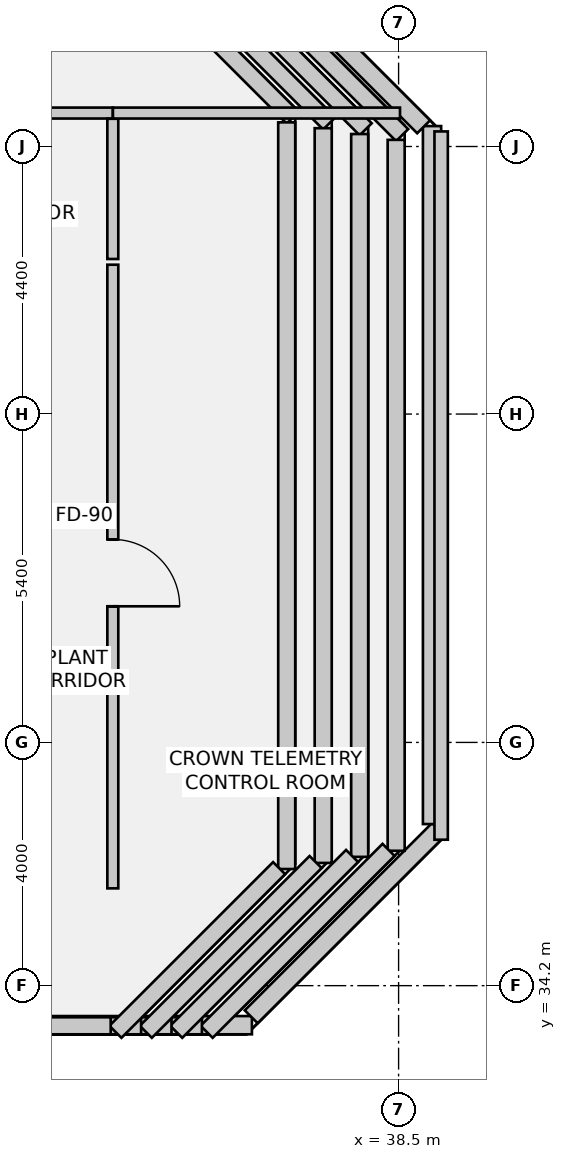
"""IFC4 building model, lengths in metres.
Left out: names, types, materials, properties, quantities, classifications, styles, units other than length and angle.
Written with IfcOpenShell. Run it as: python <this file> out.ifc"""

import sys

from ifc_helpers import new_model, si_unit, direction, frame, frame_2d, origin, place, context, subcontext, project, spatial, rectangle, extrude, source, transform, mapped, element, fill, save


model = new_model("IFC4")
c1 = context("Model", 3, precision=1e-05, world=origin(), true_north=direction((0.0, 1.0)))
c2 = subcontext(c1, "Body", "Model", "MODEL_VIEW")
j1 = project(units=[si_unit("LENGTHUNIT", "METRE"), si_unit("PLANEANGLEUNIT", "RADIAN")], contexts=[c1])
p1 = place(None, origin())
s1 = spatial("IfcSite", under=j1, at=p1, CompositionType="ELEMENT")
p2 = place(p1, origin())
s2 = spatial("IfcBuilding", under=s1, at=p2, CompositionType="ELEMENT")
p3 = place(p2, frame((0.0, 0.0, 309.5)))
s3 = spatial("IfcBuildingStorey", under=s2, at=p3, CompositionType="ELEMENT", Elevation=309.5)
p4 = place(p3, frame((27.733, 33.55, 0.0), z_axis=(0.0, 0.0, 1.0), x_axis=(1.0, 0.0, 0.0)))
e1 = element("IfcWall", 1, at=p4, inside=s3, PredefinedType="SOLIDWALL", context=c2, shape_type="SweptSolid", body=[
    extrude(rectangle(XDim=8.355, YDim=0.3, at=frame_2d((4.177, 0.0))), origin(), (0.0, 0.0, 1.0), 5.1),
])
p5 = place(p3, frame((36.076, 33.688, 0.0), z_axis=(0.0, 0.0, 1.0), x_axis=(0.707078757535, 0.707134803727, 0.0)))
e2 = element("IfcWall", 2, at=p5, inside=s3, PredefinedType="SOLIDWALL", context=c2, shape_type="SweptSolid", body=[
    extrude(rectangle(XDim=4.356, YDim=0.3, at=frame_2d((2.178, 0.0))), origin(), (0.0, 0.0, 1.0), 5.1),
])
p6 = place(p3, frame((39.05, 36.857, 0.0), z_axis=(0.0, 0.0, 1.0), x_axis=(0.0, 1.0, 0.0)))
e3 = element("IfcWall", 3, at=p6, inside=s3, PredefinedType="SOLIDWALL", context=c2, shape_type="SweptSolid", body=[
    extrude(rectangle(XDim=11.479, YDim=0.3, at=frame_2d((5.739, 0.0))), origin(), (0.0, 0.0, 1.0), 5.1),
])
p7 = place(p3, frame((38.912, 48.324, 0.0), z_axis=(0.0, 0.0, 1.0), x_axis=(-0.70715242601, 0.707061133417, 0.0)))
e4 = element("IfcWall", 4, at=p7, inside=s3, PredefinedType="SOLIDWALL", context=c2, shape_type="SweptSolid", body=[
    extrude(rectangle(XDim=2.674, YDim=0.3, at=frame_2d((1.337, 0.0))), origin(), (0.0, 0.0, 1.0), 5.1),
])
p8 = place(p3, frame((39.2, 36.6, 5.4), z_axis=(0.0, 0.0, 1.0), x_axis=(0.0, 1.0, 0.0)))
e5 = element("IfcWall", 5, at=p8, inside=s3, PredefinedType="PARAPET", context=c2, shape_type="SweptSolid", body=[
    extrude(rectangle(XDim=11.648, YDim=0.22, at=frame_2d((5.824, 0.0))), origin(), (0.0, 0.0, 1.0), 0.95),
])
p9 = place(p3, frame((36.639, 50.107, 5.4), z_axis=(0.0, 0.0, 1.0), x_axis=(0.707106781187, -0.707106781187, 0.0)))
e6 = element("IfcWall", 6, at=p9, inside=s3, PredefinedType="SOLIDWALL", context=c2, shape_type="SweptSolid", body=[
    extrude(rectangle(XDim=2.715, YDim=0.28, at=frame_2d((1.357, 0.0))), origin(), (0.0, 0.0, 1.0), 3.08),
])
p10 = place(p3, frame((38.46, 48.109, 5.4), z_axis=(0.0, 0.0, 1.0), x_axis=(0.0, -1.0, 0.0)))
e7 = element("IfcWall", 7, at=p10, inside=s3, PredefinedType="SOLIDWALL", context=c2, shape_type="SweptSolid", body=[
    extrude(rectangle(XDim=11.691, YDim=0.28, at=frame_2d((5.846, 0.0))), origin(), (0.0, 0.0, 1.0), 3.08),
])
p11 = place(p3, frame((38.335, 36.433, 5.4), z_axis=(0.0, 0.0, 1.0), x_axis=(-0.707077932049, -0.707135629147, 0.0)))
e8 = element("IfcWall", 8, at=p11, inside=s3, PredefinedType="SOLIDWALL", context=c2, shape_type="SweptSolid", body=[
    extrude(rectangle(XDim=4.231, YDim=0.28, at=frame_2d((2.116, 0.0))), origin(), (0.0, 0.0, 1.0), 3.08),
])
p12 = place(p3, frame((35.265, 33.54, 5.4), z_axis=(0.0, 0.0, 1.0), x_axis=(-1.0, 0.0, 0.0)))
e9 = element("IfcWall", 9, at=p12, inside=s3, PredefinedType="SOLIDWALL", context=c2, shape_type="SweptSolid", body=[
    extrude(rectangle(XDim=8.159, YDim=0.28, at=frame_2d((4.08, 0.0))), origin(), (0.0, 0.0, 1.0), 3.08),
])
p13 = place(p3, frame((36.039, 50.203, 9.982), z_axis=(0.0, 0.0, 1.0), x_axis=(0.707106781187, -0.707106781187, 0.0)))
e10 = element("IfcWall", 10, at=p13, inside=s3, PredefinedType="SOLIDWALL", context=c2, shape_type="SweptSolid", body=[
    extrude(rectangle(XDim=2.715, YDim=0.28, at=frame_2d((1.357, 0.0))), origin(), (0.0, 0.0, 1.0), 2.998),
])
p14 = place(p3, frame((37.86, 48.205, 9.68), z_axis=(0.0, 0.0, 1.0), x_axis=(0.0, -1.0, 0.0)))
e11 = element("IfcWall", 11, at=p14, inside=s3, PredefinedType="SOLIDWALL", context=c2, shape_type="SweptSolid", body=[
    extrude(rectangle(XDim=11.887, YDim=0.28, at=frame_2d((5.943, 0.0))), origin(), (0.0, 0.0, 1.0), 3.3),
])
p15 = place(p3, frame((37.735, 36.333, 9.532), z_axis=(0.0, 0.0, 1.0), x_axis=(-0.707106781187, -0.707106781187, 0.0)))
e12 = element("IfcWall", 12, at=p15, inside=s3, PredefinedType="SOLIDWALL", context=c2, shape_type="SweptSolid", body=[
    extrude(rectangle(XDim=4.09, YDim=0.28, at=frame_2d((2.045, 0.0))), origin(), (0.0, 0.0, 1.0), 3.448),
])
p16 = place(p3, frame((34.765, 33.54, 9.338), z_axis=(0.0, 0.0, 1.0), x_axis=(-1.0, 0.0, 0.0)))
e13 = element("IfcWall", 13, at=p16, inside=s3, PredefinedType="SOLIDWALL", context=c2, shape_type="SweptSolid", body=[
    extrude(rectangle(XDim=7.763, YDim=0.28, at=frame_2d((3.882, 0.0))), origin(), (0.0, 0.0, 1.0), 3.642),
])
p17 = place(p3, frame((35.439, 50.299, 14.482), z_axis=(0.0, 0.0, 1.0), x_axis=(0.707061818431, -0.707151741083, 0.0)))
e14 = element("IfcWall", 14, at=p17, inside=s3, PredefinedType="SOLIDWALL", context=c2, shape_type="SweptSolid", body=[
    extrude(rectangle(XDim=2.715, YDim=0.28, at=frame_2d((1.357, 0.0))), origin(), (0.0, 0.0, 1.0), 2.998),
])
p18 = place(p3, frame((37.26, 48.301, 14.168), z_axis=(0.0, 0.0, 1.0), x_axis=(0.0, -1.0, 0.0)))
e15 = element("IfcWall", 15, at=p18, inside=s3, PredefinedType="SOLIDWALL", context=c2, shape_type="SweptSolid", body=[
    extrude(rectangle(XDim=12.083, YDim=0.28, at=frame_2d((6.042, 0.0))), origin(), (0.0, 0.0, 1.0), 3.312),
])
p19 = place(p3, frame((37.135, 36.233, 14.023), z_axis=(0.0, 0.0, 1.0), x_axis=(-0.707106781187, -0.707106781187, 0.0)))
e16 = element("IfcWall", 16, at=p19, inside=s3, PredefinedType="SOLIDWALL", context=c2, shape_type="SweptSolid", body=[
    extrude(rectangle(XDim=3.948, YDim=0.28, at=frame_2d((1.974, 0.0))), origin(), (0.0, 0.0, 1.0), 3.457),
])
p20 = place(p3, frame((34.265, 33.54, 13.838), z_axis=(0.0, 0.0, 1.0), x_axis=(-1.0, 0.0, 0.0)))
e17 = element("IfcWall", 17, at=p20, inside=s3, PredefinedType="SOLIDWALL", context=c2, shape_type="SweptSolid", body=[
    extrude(rectangle(XDim=7.263, YDim=0.28, at=frame_2d((3.632, 0.0))), origin(), (0.0, 0.0, 1.0), 3.642),
])
p21 = place(p3, frame((34.839, 50.395, 18.982), z_axis=(0.0, 0.0, 1.0), x_axis=(0.707106781187, -0.707106781187, 0.0)))
e18 = element("IfcWall", 18, at=p21, inside=s3, PredefinedType="SOLIDWALL", context=c2, shape_type="SweptSolid", body=[
    extrude(rectangle(XDim=2.715, YDim=0.28, at=frame_2d((1.357, 0.0))), origin(), (0.0, 0.0, 1.0), 2.378),
])
p22 = place(p3, frame((36.66, 48.397, 18.657), z_axis=(0.0, 0.0, 1.0), x_axis=(0.0, -1.0, 0.0)))
e19 = element("IfcWall", 19, at=p22, inside=s3, PredefinedType="SOLIDWALL", context=c2, shape_type="SweptSolid", body=[
    extrude(rectangle(XDim=12.279, YDim=0.28, at=frame_2d((6.14, 0.0))), origin(), (0.0, 0.0, 1.0), 2.703),
])
p23 = place(p3, frame((36.535, 36.133, 18.513), z_axis=(0.0, 0.0, 1.0), x_axis=(-0.707074716487, -0.707138844432, 0.0)))
e20 = element("IfcWall", 20, at=p23, inside=s3, PredefinedType="SOLIDWALL", context=c2, shape_type="SweptSolid", body=[
    extrude(rectangle(XDim=3.807, YDim=0.28, at=frame_2d((1.904, 0.0))), origin(), (0.0, 0.0, 1.0), 2.847),
])
p24 = place(p3, frame((33.765, 33.54, 18.337), z_axis=(0.0, 0.0, 1.0), x_axis=(-1.0, 0.0, 0.0)))
e21 = element("IfcWall", 21, at=p24, inside=s3, PredefinedType="SOLIDWALL", context=c2, shape_type="SweptSolid", body=[
    extrude(rectangle(XDim=6.763, YDim=0.28, at=frame_2d((3.382, 0.0))), origin(), (0.0, 0.0, 1.0), 3.023),
])
p25 = place(p3, frame((16.144, 48.55, 0.0), z_axis=(0.0, 0.0, 1.0), x_axis=(1.0, 0.0, 0.0)))
e22 = element("IfcWall", 22, at=p25, inside=s3, PredefinedType="PARTITIONING", context=c2, shape_type="SweptSolid", body=[
    extrude(rectangle(XDim=17.656, YDim=0.18, at=frame_2d((8.828, 0.0))), origin(), (0.0, 0.0, 1.0), 4.392),
])
m1 = source(origin(), c2, "Body", "SweptSolid", [
    extrude(rectangle(XDim=1.1, YDim=2.15, at=frame_2d((0.55, 1.075))), frame((0.0, 0.1, 0.0), z_axis=(0.0, -1.0, 0.0), x_axis=(1.0, 0.0, 0.0)), (0.0, 0.0, 1.0), 0.2),
])
p26 = place(p25, frame((9.06, 0.0, 0.0)))
e23 = element("IfcOpeningElement", 23, at=p26, cuts=e22, PredefinedType="OPENING", context=c2, shape_type="MappedRepresentation", body=[
    mapped(m1, transform((0.0, 0.0, 0.0), scale=1.0)),
])
p27 = place(p3, frame((33.8, 48.456, 0.0), z_axis=(0.0, 0.0, 1.0), x_axis=(0.0, -1.0, 0.0)))
e24 = element("IfcWall", 24, at=p27, inside=s3, PredefinedType="PARTITIONING", context=c2, shape_type="SweptSolid", body=[
    extrude(rectangle(XDim=2.306, YDim=0.18, at=frame_2d((1.153, 0.0))), origin(), (0.0, 0.0, 1.0), 5.1),
])
p28 = place(p3, frame((33.8, 46.056, 0.0), z_axis=(0.0, 0.0, 1.0), x_axis=(0.0, -1.0, 0.0)))
e25 = element("IfcWall", 25, at=p28, inside=s3, PredefinedType="PARTITIONING", context=c2, shape_type="SweptSolid", body=[
    extrude(rectangle(XDim=10.256, YDim=0.18, at=frame_2d((5.128, 0.0))), origin(), (0.0, 0.0, 1.0), 5.1),
])
p29 = place(p28, frame((4.518, 0.0, 0.0)))
e26 = element("IfcOpeningElement", 26, at=p29, cuts=e25, PredefinedType="OPENING", context=c2, shape_type="MappedRepresentation", body=[
    mapped(m1, transform((0.0, 0.0, 0.0), scale=1.0)),
])
p30 = place(p3, frame((38.523, 48.55, 0.0), z_axis=(0.0, 0.0, 1.0), x_axis=(-1.0, 0.0, 0.0)))
e27 = element("IfcWall", 27, at=p30, inside=s3, PredefinedType="PARTITIONING", context=c2, shape_type="SweptSolid", body=[
    extrude(rectangle(XDim=4.721, YDim=0.18, at=frame_2d((2.361, 0.0))), origin(), (0.0, 0.0, 1.0), 5.1),
])
m2 = source(origin(), c2, "Body", "SweptSolid", [
    extrude(rectangle(XDim=1.1, YDim=2.15, at=frame_2d((0.55, 1.075))), frame((0.0, 0.025, 0.0), z_axis=(0.0, -1.0, 0.0), x_axis=(1.0, 0.0, 0.0)), (0.0, 0.0, 1.0), 0.05),
])
p31 = place(p29, origin())
e28 = element("IfcDoor", 28, at=p31, inside=s3, OperationType="SINGLE_SWING_RIGHT", PredefinedType="DOOR", context=c2, shape_type="MappedRepresentation", body=[
    mapped(m2, transform((0.0, 0.0, 0.0), scale=1.0)),
])
fill(e26, e28)
save(model, sys.argv[1])
